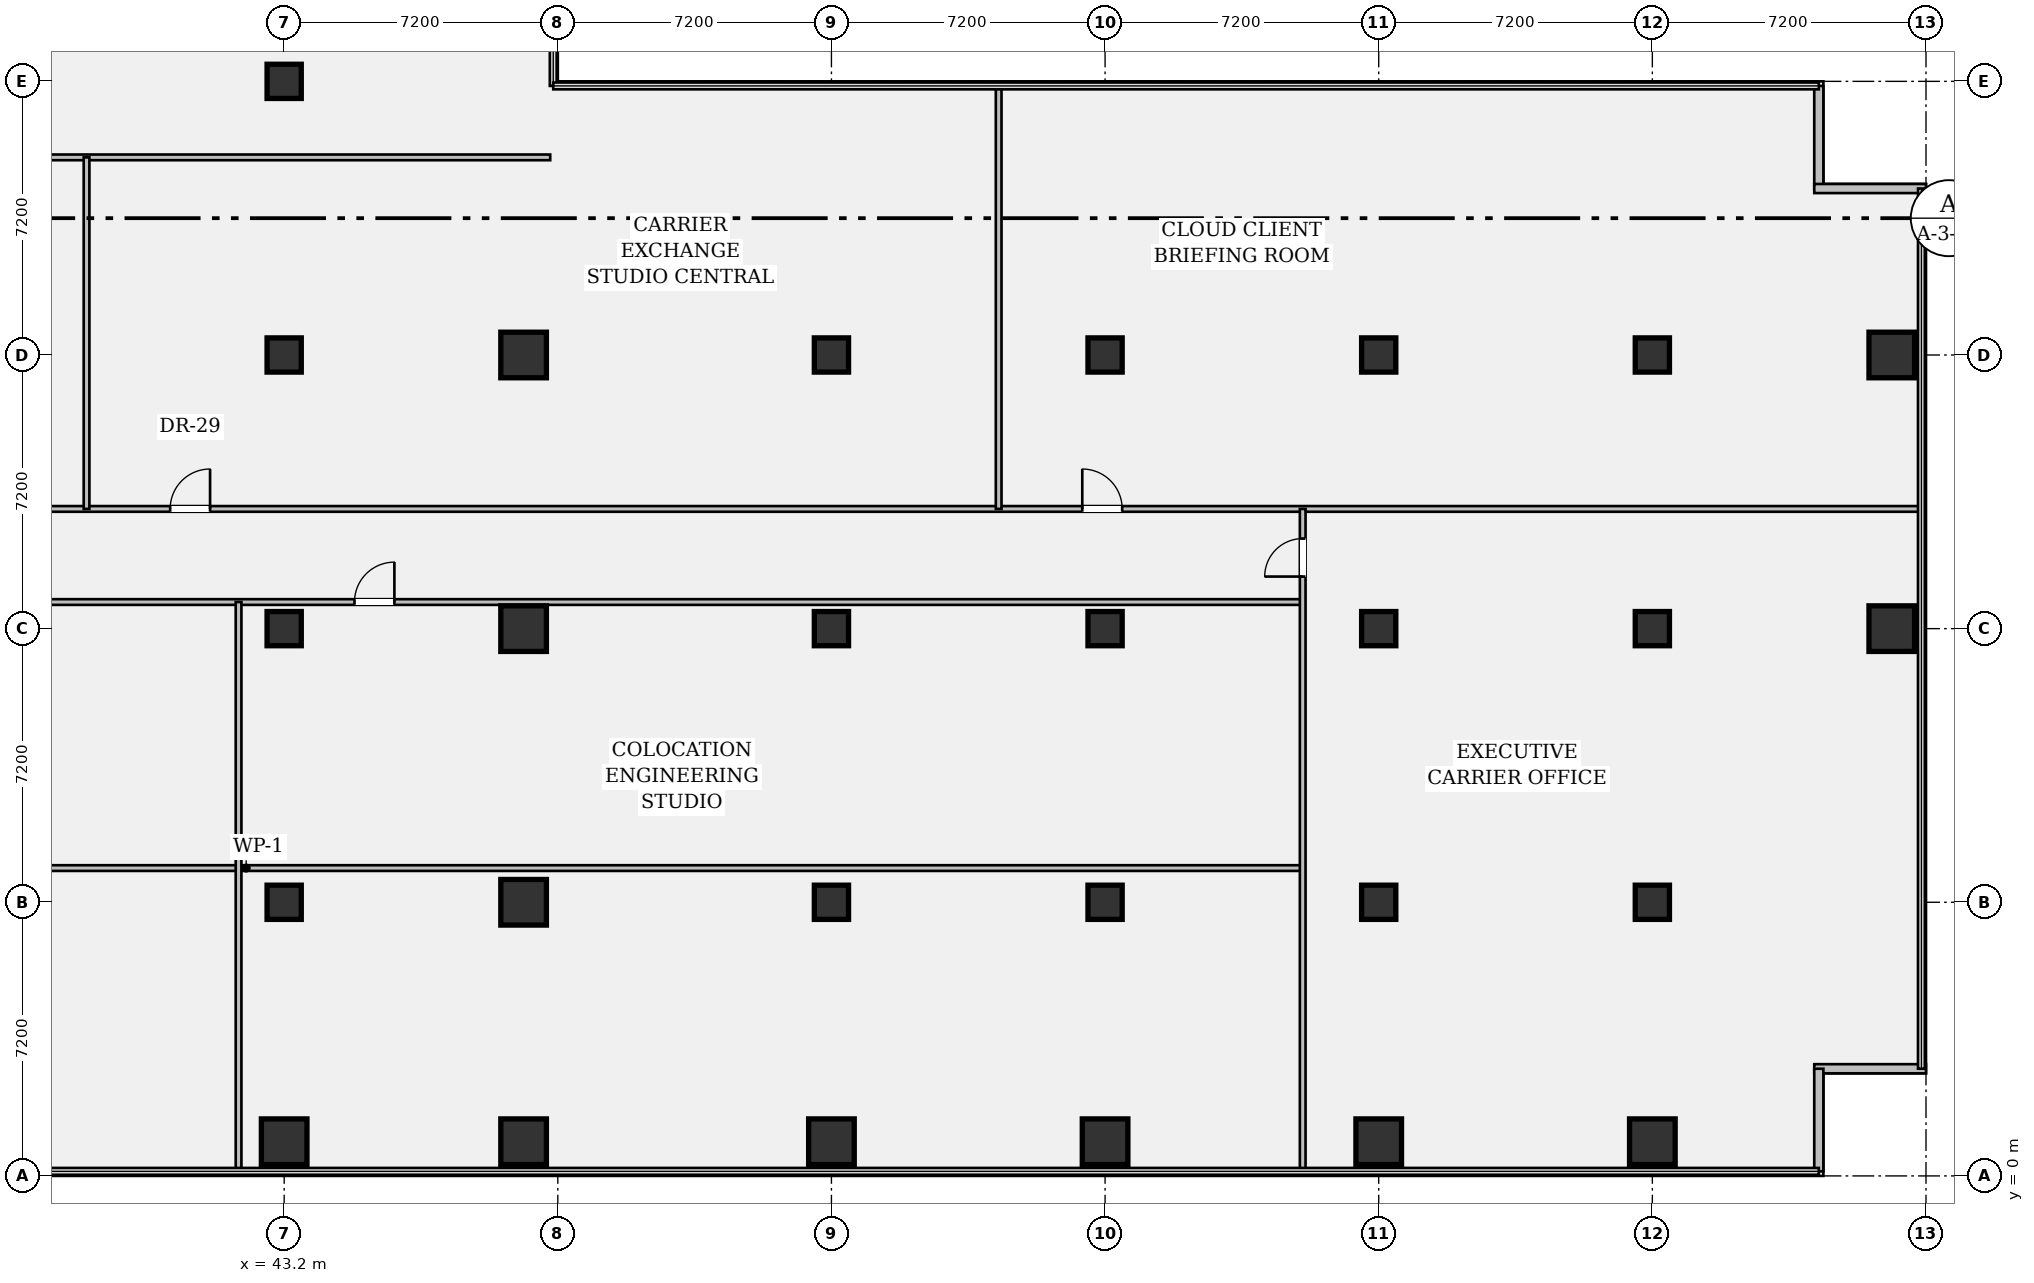
"""IFC4 building model, lengths in metres.
Left out: names, types, materials, properties, quantities, classifications, styles, units other than length and angle.
Written with IfcOpenShell. Run it as: python <this file> out.ifc"""

import sys

from ifc_helpers import new_model, si_unit, direction, frame, frame_2d, origin, origin_2d, place, context, subcontext, project, spatial, rectangle, hollow_rectangle, extrude, element, fill, save


model = new_model("IFC4")
c1 = context("Model", 3, precision=1e-05, world=origin(), true_north=direction((0.0, 1.0)))
c2 = subcontext(c1, "Body", "Model", "MODEL_VIEW")
j1 = project(units=[si_unit("LENGTHUNIT", "METRE"), si_unit("PLANEANGLEUNIT", "RADIAN")], contexts=[c1])
p1 = place(None, origin())
s1 = spatial("IfcSite", under=j1, at=p1, CompositionType="ELEMENT")
p2 = place(p1, origin())
s2 = spatial("IfcBuilding", under=s1, at=p2, CompositionType="ELEMENT")
p3 = place(p2, frame((0.0, 0.0, 5.25)))
s3 = spatial("IfcBuildingStorey", under=s2, at=p3, CompositionType="ELEMENT", Elevation=5.25)
p4 = place(p3, frame((43.2, 0.9, 0.0), z_axis=(0.0, 0.0, 1.0), x_axis=(1.0, 0.0, 0.0)))
e1 = element("IfcColumn", 1, at=p4, inside=s3, PredefinedType="COLUMN", context=c2, shape_type="SweptSolid", body=[
    extrude(hollow_rectangle(XDim=1.2, YDim=1.2, WallThickness=0.075, at=origin_2d()), origin(), (0.0, 0.0, 1.0), 3.9),
])
for number, where, z_axis, x_axis in (
    (2, (43.2, 7.2, 0.0), (0.0, 0.0, 1.0), (1.0, 0.0, 0.0)),
    (3, (43.2, 14.4, 0.0), (0.0, 0.0, 1.0), (1.0, 0.0, 0.0)),
    (4, (43.2, 21.6, 0.0), (0.0, 0.0, 1.0), (1.0, 0.0, 0.0)),
    (5, (43.2, 28.8, 0.0), (0.0, 0.0, 1.0), (1.0, 0.0, 0.0)),
):
    element("IfcColumn", number, at=place(p3, frame(where, z_axis=z_axis, x_axis=x_axis)), inside=s3, PredefinedType="COLUMN", context=c2, shape_type="SweptSolid", body=[
        extrude(rectangle(XDim=0.9, YDim=0.9, at=origin_2d()), origin(), (0.0, 0.0, 1.0), 3.9),
    ])
for number, where, z_axis, x_axis in (
    (6, (49.5, 0.9, 0.0), (0.0, 0.0, 1.0), (1.0, 0.0, 0.0)),
    (7, (49.5, 7.2, 0.0), (0.0, 0.0, 1.0), (1.0, 0.0, 0.0)),
    (8, (49.5, 14.4, 0.0), (0.0, 0.0, 1.0), (1.0, 0.0, 0.0)),
    (9, (49.5, 21.6, 0.0), (0.0, 0.0, 1.0), (1.0, 0.0, 0.0)),
    (10, (57.6, 0.9, 0.0), (0.0, 0.0, 1.0), (1.0, 0.0, 0.0)),
):
    element("IfcColumn", number, at=place(p3, frame(where, z_axis=z_axis, x_axis=x_axis)), inside=s3, PredefinedType="COLUMN", context=c2, shape_type="SweptSolid", body=[
        extrude(hollow_rectangle(XDim=1.2, YDim=1.2, WallThickness=0.075, at=origin_2d()), origin(), (0.0, 0.0, 1.0), 3.9),
    ])
for number, where, z_axis, x_axis in (
    (11, (57.6, 7.2, 0.0), (0.0, 0.0, 1.0), (1.0, 0.0, 0.0)),
    (12, (57.6, 14.4, 0.0), (0.0, 0.0, 1.0), (1.0, 0.0, 0.0)),
    (13, (57.6, 21.6, 0.0), (0.0, 0.0, 1.0), (1.0, 0.0, 0.0)),
):
    element("IfcColumn", number, at=place(p3, frame(where, z_axis=z_axis, x_axis=x_axis)), inside=s3, PredefinedType="COLUMN", context=c2, shape_type="SweptSolid", body=[
        extrude(rectangle(XDim=0.9, YDim=0.9, at=origin_2d()), origin(), (0.0, 0.0, 1.0), 3.9),
    ])
p5 = place(p3, frame((64.8, 0.9, 0.0), z_axis=(0.0, 0.0, 1.0), x_axis=(1.0, 0.0, 0.0)))
e14 = element("IfcColumn", 14, at=p5, inside=s3, PredefinedType="COLUMN", context=c2, shape_type="SweptSolid", body=[
    extrude(hollow_rectangle(XDim=1.2, YDim=1.2, WallThickness=0.075, at=origin_2d()), origin(), (0.0, 0.0, 1.0), 3.9),
])
for number, where, z_axis, x_axis in (
    (15, (64.8, 7.2, 0.0), (0.0, 0.0, 1.0), (1.0, 0.0, 0.0)),
    (16, (64.8, 14.4, 0.0), (0.0, 0.0, 1.0), (1.0, 0.0, 0.0)),
    (17, (64.8, 21.6, 0.0), (0.0, 0.0, 1.0), (1.0, 0.0, 0.0)),
):
    element("IfcColumn", number, at=place(p3, frame(where, z_axis=z_axis, x_axis=x_axis)), inside=s3, PredefinedType="COLUMN", context=c2, shape_type="SweptSolid", body=[
        extrude(rectangle(XDim=0.9, YDim=0.9, at=origin_2d()), origin(), (0.0, 0.0, 1.0), 3.9),
    ])
p6 = place(p3, frame((72.0, 0.9, 0.0), z_axis=(0.0, 0.0, 1.0), x_axis=(1.0, 0.0, 0.0)))
e18 = element("IfcColumn", 18, at=p6, inside=s3, PredefinedType="COLUMN", context=c2, shape_type="SweptSolid", body=[
    extrude(hollow_rectangle(XDim=1.2, YDim=1.2, WallThickness=0.075, at=origin_2d()), origin(), (0.0, 0.0, 1.0), 3.9),
])
for number, where, z_axis, x_axis in (
    (19, (72.0, 7.2, 0.0), (0.0, 0.0, 1.0), (1.0, 0.0, 0.0)),
    (20, (72.0, 14.4, 0.0), (0.0, 0.0, 1.0), (1.0, 0.0, 0.0)),
    (21, (72.0, 21.6, 0.0), (0.0, 0.0, 1.0), (1.0, 0.0, 0.0)),
):
    element("IfcColumn", number, at=place(p3, frame(where, z_axis=z_axis, x_axis=x_axis)), inside=s3, PredefinedType="COLUMN", context=c2, shape_type="SweptSolid", body=[
        extrude(rectangle(XDim=0.9, YDim=0.9, at=origin_2d()), origin(), (0.0, 0.0, 1.0), 3.9),
    ])
p7 = place(p3, frame((79.2, 0.9, 0.0), z_axis=(0.0, 0.0, 1.0), x_axis=(1.0, 0.0, 0.0)))
e22 = element("IfcColumn", 22, at=p7, inside=s3, PredefinedType="COLUMN", context=c2, shape_type="SweptSolid", body=[
    extrude(hollow_rectangle(XDim=1.2, YDim=1.2, WallThickness=0.075, at=origin_2d()), origin(), (0.0, 0.0, 1.0), 3.9),
])
for number, where, z_axis, x_axis in (
    (23, (79.2, 7.2, 0.0), (0.0, 0.0, 1.0), (1.0, 0.0, 0.0)),
    (24, (79.2, 14.4, 0.0), (0.0, 0.0, 1.0), (1.0, 0.0, 0.0)),
    (25, (79.2, 21.6, 0.0), (0.0, 0.0, 1.0), (1.0, 0.0, 0.0)),
):
    element("IfcColumn", number, at=place(p3, frame(where, z_axis=z_axis, x_axis=x_axis)), inside=s3, PredefinedType="COLUMN", context=c2, shape_type="SweptSolid", body=[
        extrude(rectangle(XDim=0.9, YDim=0.9, at=origin_2d()), origin(), (0.0, 0.0, 1.0), 3.9),
    ])
for number, where, z_axis, x_axis in (
    (26, (85.5, 14.4, 0.0), (0.0, 0.0, 1.0), (1.0, 0.0, 0.0)),
    (27, (85.5, 21.6, 0.0), (0.0, 0.0, 1.0), (1.0, 0.0, 0.0)),
):
    element("IfcColumn", number, at=place(p3, frame(where, z_axis=z_axis, x_axis=x_axis)), inside=s3, PredefinedType="COLUMN", context=c2, shape_type="SweptSolid", body=[
        extrude(hollow_rectangle(XDim=1.2, YDim=1.2, WallThickness=0.075, at=origin_2d()), origin(), (0.0, 0.0, 1.0), 3.9),
    ])
p8 = place(p3, frame((83.58, 28.68, 0.0), z_axis=(0.0, 0.0, 1.0), x_axis=(0.0, -1.0, 0.0)))
e28 = element("IfcWall", 28, at=p8, inside=s3, PredefinedType="STANDARD", context=c2, shape_type="SweptSolid", body=[
    extrude(rectangle(XDim=2.7, YDim=0.24, at=frame_2d((1.35, 0.0))), origin(), (0.0, 0.0, 1.0), 3.9),
])
for number, where, z_axis, x_axis in (
    (29, (83.46, 25.98, 0.0), (0.0, 0.0, 1.0), (1.0, 0.0, 0.0)),
    (30, (86.4, 2.82, 0.0), (0.0, 0.0, 1.0), (-1.0, 0.0, 0.0)),
):
    element("IfcWall", number, at=place(p3, frame(where, z_axis=z_axis, x_axis=x_axis)), inside=s3, PredefinedType="STANDARD", context=c2, shape_type="SweptSolid", body=[
        extrude(rectangle(XDim=2.94, YDim=0.24, at=frame_2d((1.47, 0.0))), origin(), (0.0, 0.0, 1.0), 3.9),
    ])
p9 = place(p3, frame((83.58, 2.82, 0.0), z_axis=(0.0, 0.0, 1.0), x_axis=(0.0, -1.0, 0.0)))
e31 = element("IfcWall", 31, at=p9, inside=s3, PredefinedType="STANDARD", context=c2, shape_type="SweptSolid", body=[
    extrude(rectangle(XDim=2.7, YDim=0.24, at=frame_2d((1.35, 0.0))), origin(), (0.0, 0.0, 1.0), 3.9),
])
p10 = place(p3, frame((14.4, 8.1, 0.0), z_axis=(0.0, 0.0, 1.0), x_axis=(1.0, 0.0, 0.0)))
e32 = element("IfcWall", 32, at=p10, inside=s3, PredefinedType="PARTITIONING", context=c2, shape_type="SweptSolid", body=[
    extrude(rectangle(XDim=55.6, YDim=0.15, at=frame_2d((27.8, 0.0))), origin(), (0.0, 0.0, 1.0), 2.938),
])
p11 = place(p10, frame((1.1, 0.0, 0.0)))
e33 = element("IfcOpeningElement", 33, at=p11, cuts=e32, PredefinedType="OPENING", context=c2, shape_type="SweptSolid", body=[
    extrude(rectangle(XDim=1.0, YDim=2.15, at=frame_2d((0.5, 1.075))), frame((0.0, 0.087, 0.0), z_axis=(0.0, -1.0, 0.0), x_axis=(1.0, 0.0, 0.0)), (0.0, 0.0, 1.0), 0.174),
])
p12 = place(p3, frame((17.45, 15.1, 0.0), z_axis=(0.0, 0.0, 1.0), x_axis=(1.0, 0.0, 0.0)))
e34 = element("IfcWall", 34, at=p12, inside=s3, PredefinedType="PARTITIONING", context=c2, shape_type="SweptSolid", body=[
    extrude(rectangle(XDim=52.55, YDim=0.15, at=frame_2d((26.275, 0.0))), origin(), (0.0, 0.0, 1.0), 2.938),
])
p13 = place(p12, frame((5.2, 0.0, 0.0)))
e35 = element("IfcOpeningElement", 35, at=p13, cuts=e34, PredefinedType="OPENING", context=c2, shape_type="SweptSolid", body=[
    extrude(rectangle(XDim=1.05, YDim=2.15, at=frame_2d((0.525, 1.075))), frame((0.0, 0.087, 0.0), z_axis=(0.0, -1.0, 0.0), x_axis=(1.0, 0.0, 0.0)), (0.0, 0.0, 1.0), 0.174),
])
p14 = place(p12, frame((27.6, 0.0, 0.0)))
e36 = element("IfcOpeningElement", 36, at=p14, cuts=e34, PredefinedType="OPENING", context=c2, shape_type="SweptSolid", body=[
    extrude(rectangle(XDim=1.05, YDim=2.15, at=frame_2d((0.525, 1.075))), frame((0.0, 0.087, 0.0), z_axis=(0.0, -1.0, 0.0), x_axis=(1.0, 0.0, 0.0)), (0.0, 0.0, 1.0), 0.174),
])
p15 = place(p3, frame((17.45, 17.55, 0.0), z_axis=(0.0, 0.0, 1.0), x_axis=(1.0, 0.0, 0.0)))
e37 = element("IfcWall", 37, at=p15, inside=s3, PredefinedType="PARTITIONING", context=c2, shape_type="SweptSolid", body=[
    extrude(rectangle(XDim=68.83, YDim=0.15, at=frame_2d((34.415, 0.0))), origin(), (0.0, 0.0, 1.0), 2.938),
])
p16 = place(p15, frame((2.4, 0.0, 0.0)))
e38 = element("IfcOpeningElement", 38, at=p16, cuts=e37, PredefinedType="OPENING", context=c2, shape_type="SweptSolid", body=[
    extrude(rectangle(XDim=1.05, YDim=2.15, at=frame_2d((0.525, 1.075))), frame((0.0, 0.087, 0.0), z_axis=(0.0, -1.0, 0.0), x_axis=(1.0, 0.0, 0.0)), (0.0, 0.0, 1.0), 0.174),
])
p17 = place(p15, frame((22.75, 0.0, 0.0)))
e39 = element("IfcOpeningElement", 39, at=p17, cuts=e37, PredefinedType="OPENING", context=c2, shape_type="SweptSolid", body=[
    extrude(rectangle(XDim=1.05, YDim=2.15, at=frame_2d((0.525, 1.075))), frame((0.0, 0.087, 0.0), z_axis=(0.0, -1.0, 0.0), x_axis=(1.0, 0.0, 0.0)), (0.0, 0.0, 1.0), 0.174),
])
p18 = place(p15, frame((46.75, 0.0, 0.0)))
e40 = element("IfcOpeningElement", 40, at=p18, cuts=e37, PredefinedType="OPENING", context=c2, shape_type="SweptSolid", body=[
    extrude(rectangle(XDim=1.05, YDim=2.15, at=frame_2d((0.525, 1.075))), frame((0.0, 0.087, 0.0), z_axis=(0.0, -1.0, 0.0), x_axis=(1.0, 0.0, 0.0)), (0.0, 0.0, 1.0), 0.174),
])
p19 = place(p3, frame((70.0, 0.12, 0.0), z_axis=(0.0, 0.0, 1.0), x_axis=(0.0, 1.0, 0.0)))
e41 = element("IfcWall", 41, at=p19, inside=s3, PredefinedType="PARTITIONING", context=c2, shape_type="SweptSolid", body=[
    extrude(rectangle(XDim=17.43, YDim=0.15, at=frame_2d((8.715, 0.0))), origin(), (0.0, 0.0, 1.0), 2.938),
])
p20 = place(p19, frame((15.65, 0.0, 0.0)))
e42 = element("IfcOpeningElement", 42, at=p20, cuts=e41, PredefinedType="OPENING", context=c2, shape_type="SweptSolid", body=[
    extrude(rectangle(XDim=1.0, YDim=2.15, at=frame_2d((0.5, 1.075))), frame((0.0, 0.087, 0.0), z_axis=(0.0, -1.0, 0.0), x_axis=(1.0, 0.0, 0.0)), (0.0, 0.0, 1.0), 0.174),
])
p21 = place(p3, frame((17.45, 26.8, 0.0), z_axis=(0.0, 0.0, 1.0), x_axis=(1.0, 0.0, 0.0)))
e43 = element("IfcWall", 43, at=p21, inside=s3, PredefinedType="PARTITIONING", context=c2, shape_type="SweptSolid", body=[
    extrude(rectangle(XDim=32.75, YDim=0.15, at=frame_2d((16.375, 0.0))), origin(), (0.0, 0.0, 1.0), 2.938),
])
p22 = place(p3, frame((38.0, 17.55, 0.0), z_axis=(0.0, 0.0, 1.0), x_axis=(0.0, 1.0, 0.0)))
e44 = element("IfcWall", 44, at=p22, inside=s3, PredefinedType="PARTITIONING", context=c2, shape_type="SweptSolid", body=[
    extrude(rectangle(XDim=9.25, YDim=0.15, at=frame_2d((4.625, 0.0))), origin(), (0.0, 0.0, 1.0), 2.938),
])
p23 = place(p3, frame((62.0, 17.55, 0.0), z_axis=(0.0, 0.0, 1.0), x_axis=(0.0, 1.0, 0.0)))
e45 = element("IfcWall", 45, at=p23, inside=s3, PredefinedType="PARTITIONING", context=c2, shape_type="SweptSolid", body=[
    extrude(rectangle(XDim=11.15, YDim=0.15, at=frame_2d((5.575, 0.0))), origin(), (0.0, 0.0, 1.0), 2.938),
])
p24 = place(p3, frame((42.0, 0.12, 0.0), z_axis=(0.0, 0.0, 1.0), x_axis=(0.0, 1.0, 0.0)))
e46 = element("IfcWall", 46, at=p24, inside=s3, PredefinedType="PARTITIONING", context=c2, shape_type="SweptSolid", body=[
    extrude(rectangle(XDim=14.98, YDim=0.15, at=frame_2d((7.49, 0.0))), origin(), (0.0, 0.0, 1.0), 2.938),
])
p25 = place(p17, origin())
e47 = element("IfcDoor", 47, at=p25, inside=s3, OperationType="SINGLE_SWING_RIGHT", PredefinedType="DOOR", context=c2, shape_type="SweptSolid", body=[
    extrude(rectangle(XDim=1.05, YDim=2.15, at=frame_2d((0.525, 1.075))), frame((0.0, 0.025, 0.0), z_axis=(0.0, -1.0, 0.0), x_axis=(1.0, 0.0, 0.0)), (0.0, 0.0, 1.0), 0.05),
])
fill(e39, e47)
p26 = place(p18, origin())
e48 = element("IfcDoor", 48, at=p26, inside=s3, OperationType="SINGLE_SWING_LEFT", PredefinedType="DOOR", context=c2, shape_type="SweptSolid", body=[
    extrude(rectangle(XDim=1.05, YDim=2.15, at=frame_2d((0.525, 1.075))), frame((0.0, 0.025, 0.0), z_axis=(0.0, -1.0, 0.0), x_axis=(1.0, 0.0, 0.0)), (0.0, 0.0, 1.0), 0.05),
])
fill(e40, e48)
p27 = place(p14, origin())
e49 = element("IfcDoor", 49, at=p27, inside=s3, OperationType="SINGLE_SWING_RIGHT", PredefinedType="DOOR", context=c2, shape_type="SweptSolid", body=[
    extrude(rectangle(XDim=1.05, YDim=2.15, at=frame_2d((0.525, 1.075))), frame((0.0, 0.025, 0.0), z_axis=(0.0, -1.0, 0.0), x_axis=(1.0, 0.0, 0.0)), (0.0, 0.0, 1.0), 0.05),
])
fill(e36, e49)
p28 = place(p20, origin())
e50 = element("IfcDoor", 50, at=p28, inside=s3, OperationType="SINGLE_SWING_LEFT", PredefinedType="DOOR", context=c2, shape_type="SweptSolid", body=[
    extrude(rectangle(XDim=1.0, YDim=2.15, at=frame_2d((0.5, 1.075))), frame((0.0, 0.025, 0.0), z_axis=(0.0, -1.0, 0.0), x_axis=(1.0, 0.0, 0.0)), (0.0, 0.0, 1.0), 0.05),
])
fill(e42, e50)
save(model, sys.argv[1])
